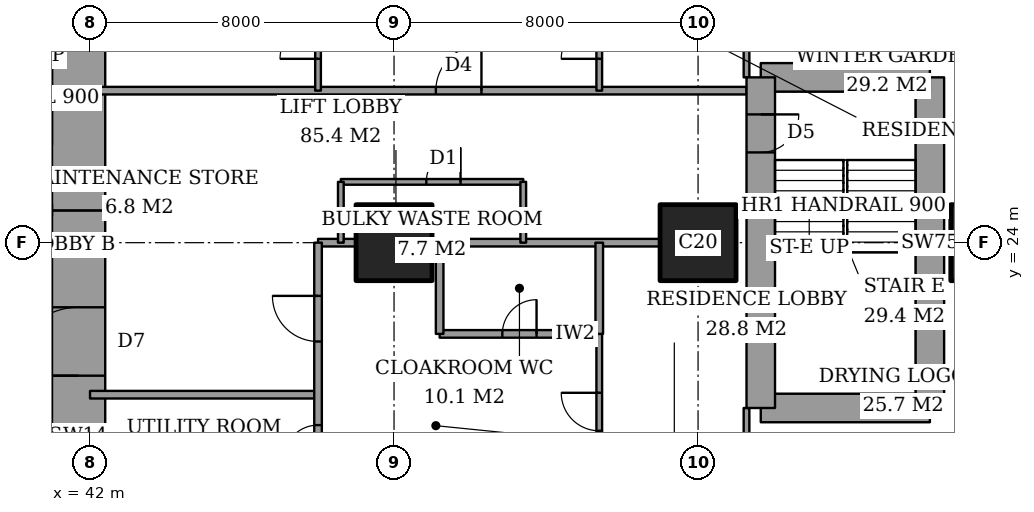
"""IFC4 building model, lengths in metres.
Left out: names, types, materials, properties, quantities, classifications, styles, units other than length and angle.
Written with IfcOpenShell. Run it as: python <this file> out.ifc"""

import sys

from ifc_helpers import new_model, si_unit, direction, frame, frame_2d, origin, origin_2d, place, context, subcontext, project, spatial, rectangle, extrude, element, fill, save


model = new_model("IFC4")
c1 = context("Model", 3, precision=1e-05, world=origin(), true_north=direction((0.0, 1.0)))
c2 = subcontext(c1, "Body", "Model", "MODEL_VIEW")
j1 = project(units=[si_unit("LENGTHUNIT", "METRE"), si_unit("PLANEANGLEUNIT", "RADIAN")], contexts=[c1])
p1 = place(None, origin())
s1 = spatial("IfcSite", under=j1, at=p1, CompositionType="ELEMENT")
p2 = place(p1, origin())
s2 = spatial("IfcBuilding", under=s1, at=p2, CompositionType="ELEMENT")
p3 = place(p2, frame((0.0, 0.0, 164.6)))
s3 = spatial("IfcBuildingStorey", under=s2, at=p3, CompositionType="ELEMENT", Elevation=164.6)
for number, where, z_axis, x_axis in (
    (1, (50.0, 24.0, 0.0), (0.0, 0.0, 1.0), (1.0, 0.0, 0.0)),
    (2, (58.0, 24.0, 0.0), (0.0, 0.0, 1.0), (1.0, 0.0, 0.0)),
    (3, (65.65, 24.0, 0.0), (0.0, 0.0, 1.0), (1.0, 0.0, 0.0)),
):
    element("IfcColumn", number, at=place(p3, frame(where, z_axis=z_axis, x_axis=x_axis)), inside=s3, PredefinedType="COLUMN", context=c2, shape_type="SweptSolid", body=[
        extrude(rectangle(XDim=2.0, YDim=2.0, at=origin_2d()), origin(), (0.0, 0.0, 1.0), 3.6),
    ])
p4 = place(p3, frame((41.7, 13.0, 0.0), z_axis=(0.0, 0.0, 1.0), x_axis=(0.0, 1.0, 0.0)))
e4 = element("IfcWall", 4, at=p4, inside=s3, PredefinedType="SHEAR", context=c2, shape_type="SweptSolid", body=[
    extrude(rectangle(XDim=11.85, YDim=1.4, at=frame_2d((5.925, 0.0))), origin(), (0.0, 0.0, 1.0), 3.6),
])
p5 = place(p4, frame((7.5, 0.0, 0.0)))
e5 = element("IfcOpeningElement", 5, at=p5, cuts=e4, PredefinedType="OPENING", context=c2, shape_type="SweptSolid", body=[
    extrude(rectangle(XDim=1.8, YDim=2.4, at=frame_2d((0.9, 1.2))), frame((0.0, 0.71, 0.0), z_axis=(0.0, -1.0, 0.0), x_axis=(1.0, 0.0, 0.0)), (0.0, 0.0, 1.0), 1.42),
])
p6 = place(p3, frame((41.7, 24.85, 0.0), z_axis=(0.0, 0.0, 1.0), x_axis=(0.0, 1.0, 0.0)))
e6 = element("IfcWall", 6, at=p6, inside=s3, PredefinedType="SHEAR", context=c2, shape_type="SweptSolid", body=[
    extrude(rectangle(XDim=10.15, YDim=1.4, at=frame_2d((5.075, 0.0))), origin(), (0.0, 0.0, 1.0), 3.6),
])
p7 = place(p3, frame((59.65, 19.65, 0.0), z_axis=(0.0, 0.0, 1.0), x_axis=(1.0, 0.0, 0.0)))
e7 = element("IfcWall", 7, at=p7, inside=s3, PredefinedType="SHEAR", context=c2, shape_type="SweptSolid", body=[
    extrude(rectangle(XDim=4.45, YDim=0.75, at=frame_2d((2.225, 0.0))), origin(), (0.0, 0.0, 1.0), 3.6),
])
p8 = place(p3, frame((64.1, 19.65, 0.0), z_axis=(0.0, 0.0, 1.0), x_axis=(0.0, 1.0, 0.0)))
e8 = element("IfcWall", 8, at=p8, inside=s3, PredefinedType="SHEAR", context=c2, shape_type="SweptSolid", body=[
    extrude(rectangle(XDim=8.7, YDim=0.75, at=frame_2d((4.35, 0.0))), origin(), (0.0, 0.0, 1.0), 3.6),
])
p9 = place(p3, frame((64.1, 28.35, 0.0), z_axis=(0.0, 0.0, 1.0), x_axis=(-1.0, 0.0, 0.0)))
e9 = element("IfcWall", 9, at=p9, inside=s3, PredefinedType="SHEAR", context=c2, shape_type="SweptSolid", body=[
    extrude(rectangle(XDim=4.45, YDim=0.75, at=frame_2d((2.225, 0.0))), origin(), (0.0, 0.0, 1.0), 3.6),
])
p10 = place(p3, frame((59.65, 28.35, 0.0), z_axis=(0.0, 0.0, 1.0), x_axis=(0.0, -1.0, 0.0)))
e10 = element("IfcWall", 10, at=p10, inside=s3, PredefinedType="SHEAR", context=c2, shape_type="SweptSolid", body=[
    extrude(rectangle(XDim=8.7, YDim=0.75, at=frame_2d((4.35, 0.0))), origin(), (0.0, 0.0, 1.0), 3.6),
])
p11 = place(p10, frame((0.975, 0.0, 0.0)))
e11 = element("IfcOpeningElement", 11, at=p11, cuts=e10, PredefinedType="OPENING", context=c2, shape_type="SweptSolid", body=[
    extrude(rectangle(XDim=1.0, YDim=2.1, at=frame_2d((0.5, 1.05))), frame((0.0, 0.385, 0.0), z_axis=(0.0, -1.0, 0.0), x_axis=(1.0, 0.0, 0.0)), (0.0, 0.0, 1.0), 0.77),
])
p12 = place(p3, frame((42.0, 20.0, 0.0), z_axis=(0.0, 0.0, 1.0), x_axis=(1.0, 0.0, 0.0)))
e12 = element("IfcWall", 12, at=p12, inside=s3, PredefinedType="PARTITIONING", context=c2, shape_type="SweptSolid", body=[
    extrude(rectangle(XDim=6.0, YDim=0.2, at=frame_2d((3.0, 0.0))), origin(), (0.0, 0.0, 1.0), 3.35),
])
p13 = place(p3, frame((51.2, 21.6, 0.0), z_axis=(0.0, 0.0, 1.0), x_axis=(1.0, 0.0, 0.0)))
e13 = element("IfcWall", 13, at=p13, inside=s3, PredefinedType="PARTITIONING", context=c2, shape_type="SweptSolid", body=[
    extrude(rectangle(XDim=4.2, YDim=0.2, at=frame_2d((2.1, 0.0))), origin(), (0.0, 0.0, 1.0), 3.35),
])
p14 = place(p13, frame((1.65, 0.0, 0.0)))
e14 = element("IfcOpeningElement", 14, at=p14, cuts=e13, PredefinedType="OPENING", context=c2, shape_type="SweptSolid", body=[
    extrude(rectangle(XDim=0.9, YDim=2.1, at=frame_2d((0.45, 1.05))), frame((0.0, 0.11, 0.0), z_axis=(0.0, -1.0, 0.0), x_axis=(1.0, 0.0, 0.0)), (0.0, 0.0, 1.0), 0.22),
])
p15 = place(p3, frame((48.0, 24.0, 0.0), z_axis=(0.0, 0.0, 1.0), x_axis=(1.0, 0.0, 0.0)))
e15 = element("IfcWall", 15, at=p15, inside=s3, PredefinedType="PARTITIONING", context=c2, shape_type="SweptSolid", body=[
    extrude(rectangle(XDim=1.0, YDim=0.2, at=frame_2d((0.5, 0.0))), origin(), (0.0, 0.0, 1.0), 3.35),
])
p16 = place(p3, frame((51.0, 24.0, 0.0), z_axis=(0.0, 0.0, 1.0), x_axis=(1.0, 0.0, 0.0)))
e16 = element("IfcWall", 16, at=p16, inside=s3, PredefinedType="PARTITIONING", context=c2, shape_type="SweptSolid", body=[
    extrude(rectangle(XDim=6.0, YDim=0.2, at=frame_2d((3.0, 0.0))), origin(), (0.0, 0.0, 1.0), 3.35),
])
p17 = place(p3, frame((48.6, 25.6, 0.0), z_axis=(0.0, 0.0, 1.0), x_axis=(1.0, 0.0, 0.0)))
e17 = element("IfcWall", 17, at=p17, inside=s3, PredefinedType="PARTITIONING", context=c2, shape_type="SweptSolid", body=[
    extrude(rectangle(XDim=4.8, YDim=0.15, at=frame_2d((2.4, 0.0))), origin(), (0.0, 0.0, 1.0), 3.35),
])
p18 = place(p17, frame((2.25, 0.0, 0.0)))
e18 = element("IfcOpeningElement", 18, at=p18, cuts=e17, PredefinedType="OPENING", context=c2, shape_type="SweptSolid", body=[
    extrude(rectangle(XDim=0.9, YDim=2.1, at=frame_2d((0.45, 1.05))), frame((0.0, 0.085, 0.0), z_axis=(0.0, -1.0, 0.0), x_axis=(1.0, 0.0, 0.0)), (0.0, 0.0, 1.0), 0.17),
])
p19 = place(p3, frame((42.0, 28.0, 0.0), z_axis=(0.0, 0.0, 1.0), x_axis=(1.0, 0.0, 0.0)))
e19 = element("IfcWall", 19, at=p19, inside=s3, PredefinedType="PARTITIONING", context=c2, shape_type="SweptSolid", body=[
    extrude(rectangle(XDim=17.275, YDim=0.2, at=frame_2d((8.637, 0.0))), origin(), (0.0, 0.0, 1.0), 3.35),
])
p20 = place(p19, frame((9.1, 0.0, 0.0)))
e20 = element("IfcOpeningElement", 20, at=p20, cuts=e19, PredefinedType="OPENING", context=c2, shape_type="SweptSolid", body=[
    extrude(rectangle(XDim=1.2, YDim=2.4, at=frame_2d((0.6, 1.2))), frame((0.0, 0.11, 0.0), z_axis=(0.0, -1.0, 0.0), x_axis=(1.0, 0.0, 0.0)), (0.0, 0.0, 1.0), 0.22),
])
p21 = place(p3, frame((48.0, 17.5, 0.0), z_axis=(0.0, 0.0, 1.0), x_axis=(0.0, 1.0, 0.0)))
e21 = element("IfcWall", 21, at=p21, inside=s3, PredefinedType="PARTITIONING", context=c2, shape_type="SweptSolid", body=[
    extrude(rectangle(XDim=6.5, YDim=0.2, at=frame_2d((3.25, 0.0))), origin(), (0.0, 0.0, 1.0), 3.35),
])
p22 = place(p21, frame((3.9, 0.0, 0.0)))
e22 = element("IfcOpeningElement", 22, at=p22, cuts=e21, PredefinedType="OPENING", context=c2, shape_type="SweptSolid", body=[
    extrude(rectangle(XDim=1.2, YDim=2.4, at=frame_2d((0.6, 1.2))), frame((0.0, 0.11, 0.0), z_axis=(0.0, -1.0, 0.0), x_axis=(1.0, 0.0, 0.0)), (0.0, 0.0, 1.0), 0.22),
])
p23 = place(p21, frame((0.8, 0.0, 0.0)))
e23 = element("IfcOpeningElement", 23, at=p23, cuts=e21, PredefinedType="OPENING", context=c2, shape_type="SweptSolid", body=[
    extrude(rectangle(XDim=0.9, YDim=2.1, at=frame_2d((0.45, 1.05))), frame((0.0, 0.11, 0.0), z_axis=(0.0, -1.0, 0.0), x_axis=(1.0, 0.0, 0.0)), (0.0, 0.0, 1.0), 0.22),
])
p24 = place(p3, frame((48.0, 28.0, 0.0), z_axis=(0.0, 0.0, 1.0), x_axis=(0.0, 1.0, 0.0)))
e24 = element("IfcWall", 24, at=p24, inside=s3, PredefinedType="PARTITIONING", context=c2, shape_type="SweptSolid", body=[
    extrude(rectangle(XDim=9.4, YDim=0.15, at=frame_2d((4.7, 0.0))), origin(), (0.0, 0.0, 1.0), 3.35),
])
p25 = place(p24, frame((0.837, 0.0, 0.0)))
e25 = element("IfcOpeningElement", 25, at=p25, cuts=e24, PredefinedType="OPENING", context=c2, shape_type="SweptSolid", body=[
    extrude(rectangle(XDim=1.0, YDim=2.1, at=frame_2d((0.5, 1.05))), frame((0.0, 0.085, 0.0), z_axis=(0.0, -1.0, 0.0), x_axis=(1.0, 0.0, 0.0)), (0.0, 0.0, 1.0), 0.17),
])
p26 = place(p3, frame((48.6, 24.0, 0.0), z_axis=(0.0, 0.0, 1.0), x_axis=(0.0, 1.0, 0.0)))
e26 = element("IfcWall", 26, at=p26, inside=s3, PredefinedType="PARTITIONING", context=c2, shape_type="SweptSolid", body=[
    extrude(rectangle(XDim=1.6, YDim=0.15, at=frame_2d((0.8, 0.0))), origin(), (0.0, 0.0, 1.0), 3.35),
])
p27 = place(p3, frame((51.2, 21.6, 0.0), z_axis=(0.0, 0.0, 1.0), x_axis=(0.0, 1.0, 0.0)))
e27 = element("IfcWall", 27, at=p27, inside=s3, PredefinedType="PARTITIONING", context=c2, shape_type="SweptSolid", body=[
    extrude(rectangle(XDim=2.4, YDim=0.2, at=frame_2d((1.2, 0.0))), origin(), (0.0, 0.0, 1.0), 3.35),
])
p28 = place(p3, frame((53.4, 24.0, 0.0), z_axis=(0.0, 0.0, 1.0), x_axis=(0.0, 1.0, 0.0)))
e28 = element("IfcWall", 28, at=p28, inside=s3, PredefinedType="PARTITIONING", context=c2, shape_type="SweptSolid", body=[
    extrude(rectangle(XDim=1.6, YDim=0.15, at=frame_2d((0.8, 0.0))), origin(), (0.0, 0.0, 1.0), 3.35),
])
p29 = place(p3, frame((55.4, 21.6, 0.0), z_axis=(0.0, 0.0, 1.0), x_axis=(0.0, 1.0, 0.0)))
e29 = element("IfcWall", 29, at=p29, inside=s3, PredefinedType="PARTITIONING", context=c2, shape_type="SweptSolid", body=[
    extrude(rectangle(XDim=2.4, YDim=0.2, at=frame_2d((1.2, 0.0))), origin(), (0.0, 0.0, 1.0), 3.35),
])
p30 = place(p3, frame((55.4, 11.0, 0.0), z_axis=(0.0, 0.0, 1.0), x_axis=(0.0, 1.0, 0.0)))
e30 = element("IfcWall", 30, at=p30, inside=s3, PredefinedType="PARTITIONING", context=c2, shape_type="SweptSolid", body=[
    extrude(rectangle(XDim=10.6, YDim=0.15, at=frame_2d((5.3, 0.0))), origin(), (0.0, 0.0, 1.0), 3.35),
])
p31 = place(p30, frame((8.05, 0.0, 0.0)))
e31 = element("IfcOpeningElement", 31, at=p31, cuts=e30, PredefinedType="OPENING", context=c2, shape_type="SweptSolid", body=[
    extrude(rectangle(XDim=1.0, YDim=2.1, at=frame_2d((0.5, 1.05))), frame((0.0, 0.085, 0.0), z_axis=(0.0, -1.0, 0.0), x_axis=(1.0, 0.0, 0.0)), (0.0, 0.0, 1.0), 0.17),
])
p32 = place(p3, frame((55.4, 28.0, 0.0), z_axis=(0.0, 0.0, 1.0), x_axis=(0.0, 1.0, 0.0)))
e32 = element("IfcWall", 32, at=p32, inside=s3, PredefinedType="PARTITIONING", context=c2, shape_type="SweptSolid", body=[
    extrude(rectangle(XDim=9.4, YDim=0.15, at=frame_2d((4.7, 0.0))), origin(), (0.0, 0.0, 1.0), 3.35),
])
p33 = place(p32, frame((0.837, 0.0, 0.0)))
e33 = element("IfcOpeningElement", 33, at=p33, cuts=e32, PredefinedType="OPENING", context=c2, shape_type="SweptSolid", body=[
    extrude(rectangle(XDim=1.0, YDim=2.1, at=frame_2d((0.5, 1.05))), frame((0.0, 0.085, 0.0), z_axis=(0.0, -1.0, 0.0), x_axis=(1.0, 0.0, 0.0)), (0.0, 0.0, 1.0), 0.17),
])
p34 = place(p3, frame((59.275, 17.2, 0.0), z_axis=(0.0, 0.0, 1.0), x_axis=(0.0, 1.0, 0.0)))
e34 = element("IfcWall", 34, at=p34, inside=s3, PredefinedType="PARTITIONING", context=c2, shape_type="SweptSolid", body=[
    extrude(rectangle(XDim=2.45, YDim=0.15, at=frame_2d((1.225, 0.0))), origin(), (0.0, 0.0, 1.0), 3.35),
])
p35 = place(p34, frame((0.587, 0.0, 0.0)))
e35 = element("IfcOpeningElement", 35, at=p35, cuts=e34, PredefinedType="OPENING", context=c2, shape_type="SweptSolid", body=[
    extrude(rectangle(XDim=0.9, YDim=2.1, at=frame_2d((0.45, 1.05))), frame((0.0, 0.085, 0.0), z_axis=(0.0, -1.0, 0.0), x_axis=(1.0, 0.0, 0.0)), (0.0, 0.0, 1.0), 0.17),
])
p36 = place(p3, frame((59.275, 28.35, 0.0), z_axis=(0.0, 0.0, 1.0), x_axis=(0.0, 1.0, 0.0)))
e36 = element("IfcWall", 36, at=p36, inside=s3, PredefinedType="PARTITIONING", context=c2, shape_type="SweptSolid", body=[
    extrude(rectangle(XDim=2.45, YDim=0.15, at=frame_2d((1.225, 0.0))), origin(), (0.0, 0.0, 1.0), 3.35),
])
p37 = place(p36, frame((0.913, 0.0, 0.0)))
e37 = element("IfcOpeningElement", 37, at=p37, cuts=e36, PredefinedType="OPENING", context=c2, shape_type="SweptSolid", body=[
    extrude(rectangle(XDim=1.0, YDim=2.1, at=frame_2d((0.5, 1.05))), frame((0.0, 0.085, 0.0), z_axis=(0.0, -1.0, 0.0), x_axis=(1.0, 0.0, 0.0)), (0.0, 0.0, 1.0), 0.17),
])
p38 = place(p31, origin())
e38 = element("IfcDoor", 38, at=p38, inside=s3, OperationType="SINGLE_SWING_LEFT", PredefinedType="DOOR", context=c2, shape_type="SweptSolid", body=[
    extrude(rectangle(XDim=1.0, YDim=2.1, at=frame_2d((0.5, 1.05))), frame((0.0, 0.025, 0.0), z_axis=(0.0, -1.0, 0.0), x_axis=(1.0, 0.0, 0.0)), (0.0, 0.0, 1.0), 0.05),
])
fill(e31, e38)
p39 = place(p14, origin())
e39 = element("IfcDoor", 39, at=p39, inside=s3, OperationType="SINGLE_SWING_LEFT", PredefinedType="DOOR", context=c2, shape_type="SweptSolid", body=[
    extrude(rectangle(XDim=0.9, YDim=2.1, at=frame_2d((0.45, 1.05))), frame((0.0, 0.025, 0.0), z_axis=(0.0, -1.0, 0.0), x_axis=(1.0, 0.0, 0.0)), (0.0, 0.0, 1.0), 0.05),
])
fill(e14, e39)
p40 = place(p22, origin())
e40 = element("IfcDoor", 40, at=p40, inside=s3, OperationType="SINGLE_SWING_LEFT", PredefinedType="DOOR", context=c2, shape_type="SweptSolid", body=[
    extrude(rectangle(XDim=1.2, YDim=2.4, at=frame_2d((0.6, 1.2))), frame((0.0, 0.025, 0.0), z_axis=(0.0, -1.0, 0.0), x_axis=(1.0, 0.0, 0.0)), (0.0, 0.0, 1.0), 0.05),
])
fill(e22, e40)
p41 = place(p23, origin())
e41 = element("IfcDoor", 41, at=p41, inside=s3, OperationType="SINGLE_SWING_RIGHT", PredefinedType="DOOR", context=c2, shape_type="SweptSolid", body=[
    extrude(rectangle(XDim=0.9, YDim=2.1, at=frame_2d((0.45, 1.05))), frame((0.0, 0.025, 0.0), z_axis=(0.0, -1.0, 0.0), x_axis=(1.0, 0.0, 0.0)), (0.0, 0.0, 1.0), 0.05),
])
fill(e23, e41)
p42 = place(p33, origin())
e42 = element("IfcDoor", 42, at=p42, inside=s3, OperationType="SINGLE_SWING_RIGHT", PredefinedType="DOOR", context=c2, shape_type="SweptSolid", body=[
    extrude(rectangle(XDim=1.0, YDim=2.1, at=frame_2d((0.5, 1.05))), frame((0.0, 0.025, 0.0), z_axis=(0.0, -1.0, 0.0), x_axis=(1.0, 0.0, 0.0)), (0.0, 0.0, 1.0), 0.05),
])
fill(e33, e42)
p43 = place(p20, origin())
e43 = element("IfcDoor", 43, at=p43, inside=s3, OperationType="SINGLE_SWING_LEFT", PredefinedType="DOOR", context=c2, shape_type="SweptSolid", body=[
    extrude(rectangle(XDim=1.2, YDim=2.4, at=frame_2d((0.6, 1.2))), frame((0.0, 0.025, 0.0), z_axis=(0.0, -1.0, 0.0), x_axis=(1.0, 0.0, 0.0)), (0.0, 0.0, 1.0), 0.05),
])
fill(e20, e43)
p44 = place(p25, origin())
e44 = element("IfcDoor", 44, at=p44, inside=s3, OperationType="SINGLE_SWING_RIGHT", PredefinedType="DOOR", context=c2, shape_type="SweptSolid", body=[
    extrude(rectangle(XDim=1.0, YDim=2.1, at=frame_2d((0.5, 1.05))), frame((0.0, 0.025, 0.0), z_axis=(0.0, -1.0, 0.0), x_axis=(1.0, 0.0, 0.0)), (0.0, 0.0, 1.0), 0.05),
])
fill(e25, e44)
p45 = place(p18, origin())
e45 = element("IfcDoor", 45, at=p45, inside=s3, OperationType="SINGLE_SWING_LEFT", PredefinedType="DOOR", context=c2, shape_type="SweptSolid", body=[
    extrude(rectangle(XDim=0.9, YDim=2.1, at=frame_2d((0.45, 1.05))), frame((0.0, 0.025, 0.0), z_axis=(0.0, -1.0, 0.0), x_axis=(1.0, 0.0, 0.0)), (0.0, 0.0, 1.0), 0.05),
])
fill(e18, e45)
p46 = place(p5, origin())
e46 = element("IfcDoor", 46, at=p46, inside=s3, OperationType="DOUBLE_DOOR_DOUBLE_SWING", PredefinedType="DOOR", context=c2, shape_type="SweptSolid", body=[
    extrude(rectangle(XDim=1.8, YDim=2.4, at=frame_2d((0.9, 1.2))), frame((0.0, 0.025, 0.0), z_axis=(0.0, -1.0, 0.0), x_axis=(1.0, 0.0, 0.0)), (0.0, 0.0, 1.0), 0.05),
])
fill(e5, e46)
p47 = place(p11, origin())
e47 = element("IfcDoor", 47, at=p47, inside=s3, OperationType="SINGLE_SWING_RIGHT", PredefinedType="DOOR", context=c2, shape_type="SweptSolid", body=[
    extrude(rectangle(XDim=1.0, YDim=2.1, at=frame_2d((0.5, 1.05))), frame((0.0, 0.025, 0.0), z_axis=(0.0, -1.0, 0.0), x_axis=(1.0, 0.0, 0.0)), (0.0, 0.0, 1.0), 0.05),
])
fill(e11, e47)
save(model, sys.argv[1])
